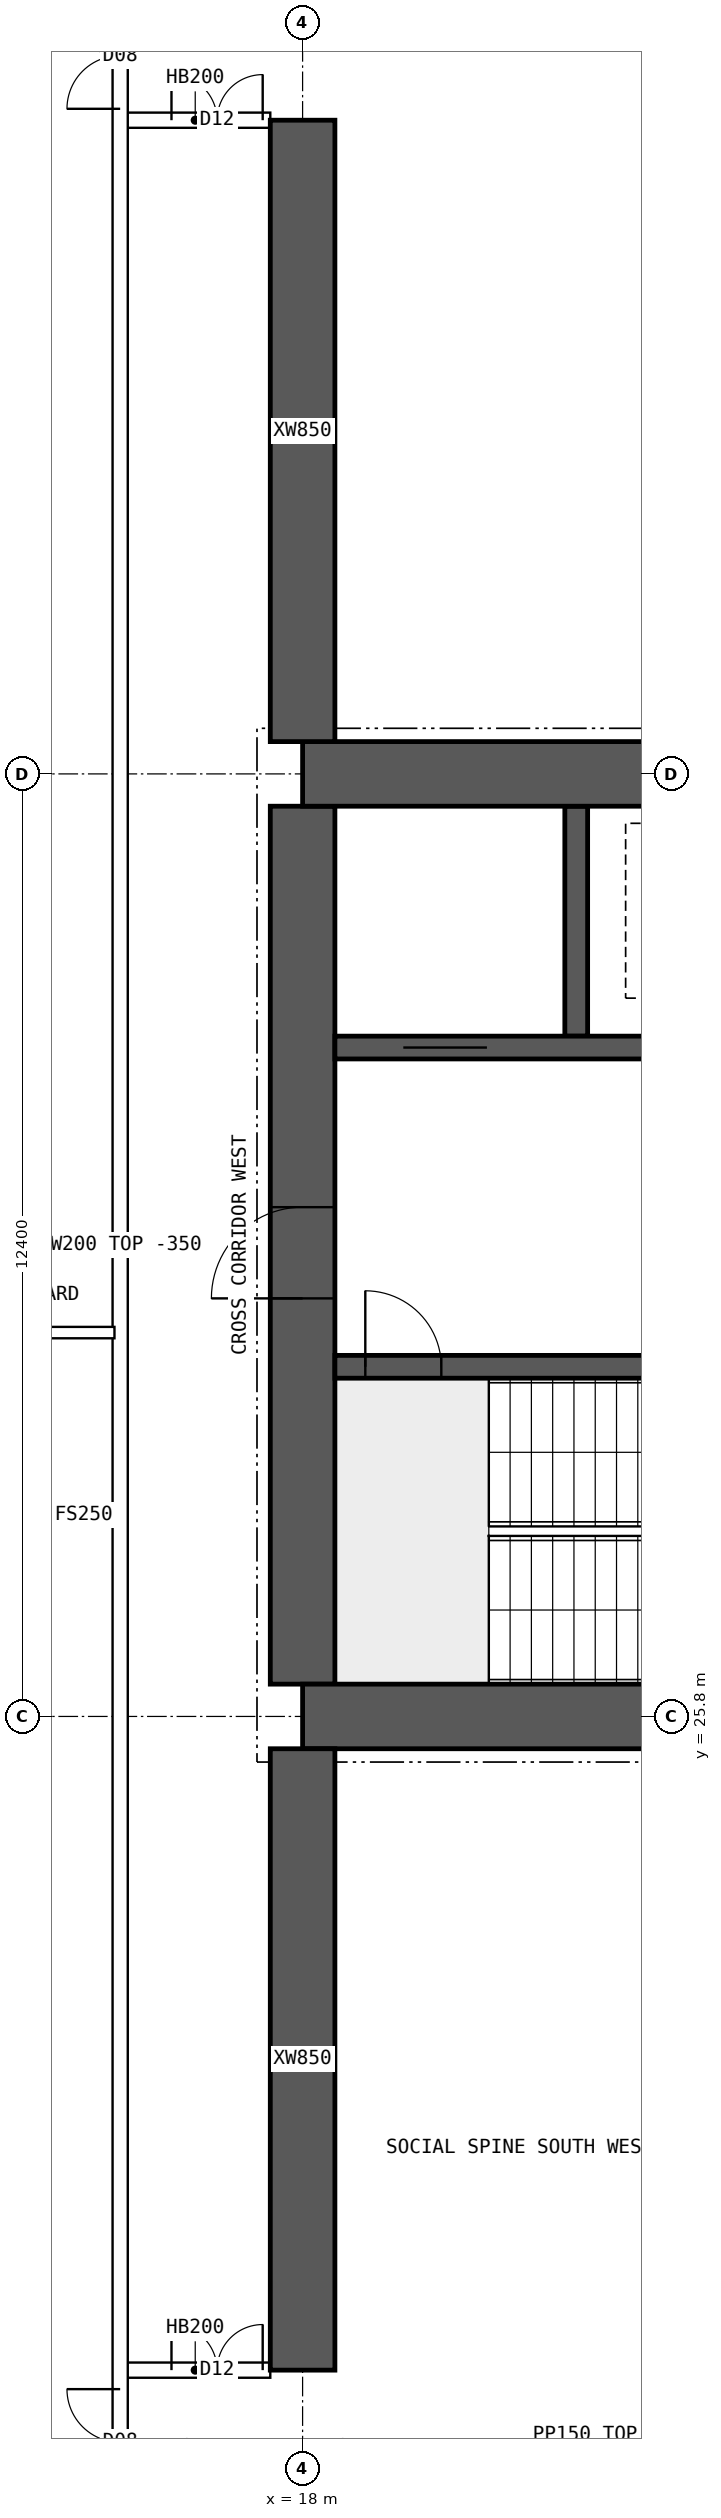
"""IFC4 building model, lengths in metres.
Left out: names, types, materials, properties, quantities, classifications, styles, units other than length and angle.
Written with IfcOpenShell. Run it as: python <this file> out.ifc"""

import sys

from ifc_helpers import new_model, si_unit, direction, frame, frame_2d, origin, place, context, subcontext, project, spatial, polyline, rectangle, outline, extrude, element, fill, save


model = new_model("IFC4")
c1 = context("Model", 3, precision=1e-05, world=origin(), true_north=direction((0.0, 1.0)))
c2 = subcontext(c1, "Body", "Model", "MODEL_VIEW")
j1 = project(units=[si_unit("LENGTHUNIT", "METRE"), si_unit("PLANEANGLEUNIT", "RADIAN")], contexts=[c1])
p1 = place(None, origin())
s1 = spatial("IfcSite", under=j1, at=p1, CompositionType="ELEMENT")
p2 = place(p1, origin())
s2 = spatial("IfcBuilding", under=s1, at=p2, CompositionType="ELEMENT")
p3 = place(p2, frame((0.0, 0.0, 197.35)))
s3 = spatial("IfcBuildingStorey", under=s2, at=p3, CompositionType="ELEMENT", Elevation=197.35)
for number, where, z_axis, x_axis in (
    (1, (18.0, 25.8, 0.0), (0.0, 0.0, 1.0), (1.0, 0.0, 0.0)),
    (2, (18.0, 38.2, 0.0), (0.0, 0.0, 1.0), (1.0, 0.0, 0.0)),
):
    element("IfcWall", number, at=place(p3, frame(where, z_axis=z_axis, x_axis=x_axis)), inside=s3, PredefinedType="SHEAR", context=c2, shape_type="SweptSolid", body=[
        extrude(rectangle(XDim=48.0, YDim=0.85, at=frame_2d((24.0, 0.0))), origin(), (0.0, 0.0, 1.0), 3.75),
    ])
p4 = place(p3, frame((18.0, 26.225, 0.0), z_axis=(0.0, 0.0, 1.0), x_axis=(0.0, 1.0, 0.0)))
e3 = element("IfcWall", 3, at=p4, inside=s3, PredefinedType="SHEAR", context=c2, shape_type="SweptSolid", body=[
    extrude(rectangle(XDim=11.55, YDim=0.85, at=frame_2d((5.775, 0.0))), origin(), (0.0, 0.0, 1.0), 3.75),
])
p5 = place(p4, frame((5.075, 0.0, 0.0)))
e4 = element("IfcOpeningElement", 4, at=p5, cuts=e3, PredefinedType="OPENING", context=c2, shape_type="SweptSolid", body=[
    extrude(rectangle(XDim=1.2, YDim=2.1, at=frame_2d((0.6, 1.05))), frame((0.0, 0.435, 0.0), z_axis=(0.0, -1.0, 0.0), x_axis=(1.0, 0.0, 0.0)), (0.0, 0.0, 1.0), 0.87),
])
p6 = place(p3, frame((18.425, 30.4, 0.0), z_axis=(0.0, 0.0, 1.0), x_axis=(1.0, 0.0, 0.0)))
e5 = element("IfcWall", 5, at=p6, inside=s3, PredefinedType="SHEAR", context=c2, shape_type="SweptSolid", body=[
    extrude(rectangle(XDim=47.15, YDim=0.3, at=frame_2d((23.575, 0.0))), origin(), (0.0, 0.0, 1.0), 3.75),
])
p7 = place(p6, frame((0.4, 0.0, 0.0)))
e6 = element("IfcOpeningElement", 6, at=p7, cuts=e5, PredefinedType="OPENING", context=c2, shape_type="SweptSolid", body=[
    extrude(rectangle(XDim=1.0, YDim=2.1, at=frame_2d((0.5, 1.05))), frame((0.0, 0.16, 0.0), z_axis=(0.0, -1.0, 0.0), x_axis=(1.0, 0.0, 0.0)), (0.0, 0.0, 1.0), 0.32),
])
p8 = place(p6, frame((45.75, 0.0, 0.0)))
e7 = element("IfcOpeningElement", 7, at=p8, cuts=e5, PredefinedType="OPENING", context=c2, shape_type="SweptSolid", body=[
    extrude(rectangle(XDim=1.0, YDim=2.1, at=frame_2d((0.5, 1.05))), frame((0.0, 0.16, 0.0), z_axis=(0.0, -1.0, 0.0), x_axis=(1.0, 0.0, 0.0)), (0.0, 0.0, 1.0), 0.32),
])
p9 = place(p6, frame((8.325, 0.0, 0.0)))
e8 = element("IfcOpeningElement", 8, at=p9, cuts=e5, PredefinedType="OPENING", context=c2, shape_type="SweptSolid", body=[
    extrude(rectangle(XDim=1.1, YDim=2.1, at=frame_2d((0.55, 1.05))), frame((0.0, 0.16, 0.0), z_axis=(0.0, -1.0, 0.0), x_axis=(1.0, 0.0, 0.0)), (0.0, 0.0, 1.0), 0.32),
])
p10 = place(p6, frame((10.925, 0.0, 0.0)))
e9 = element("IfcOpeningElement", 9, at=p10, cuts=e5, PredefinedType="OPENING", context=c2, shape_type="SweptSolid", body=[
    extrude(rectangle(XDim=1.1, YDim=2.1, at=frame_2d((0.55, 1.05))), frame((0.0, 0.16, 0.0), z_axis=(0.0, -1.0, 0.0), x_axis=(1.0, 0.0, 0.0)), (0.0, 0.0, 1.0), 0.32),
])
p11 = place(p6, frame((13.525, 0.0, 0.0)))
e10 = element("IfcOpeningElement", 10, at=p11, cuts=e5, PredefinedType="OPENING", context=c2, shape_type="SweptSolid", body=[
    extrude(rectangle(XDim=1.1, YDim=2.1, at=frame_2d((0.55, 1.05))), frame((0.0, 0.16, 0.0), z_axis=(0.0, -1.0, 0.0), x_axis=(1.0, 0.0, 0.0)), (0.0, 0.0, 1.0), 0.32),
])
p12 = place(p6, frame((16.125, 0.0, 0.0)))
e11 = element("IfcOpeningElement", 11, at=p12, cuts=e5, PredefinedType="OPENING", context=c2, shape_type="SweptSolid", body=[
    extrude(rectangle(XDim=1.1, YDim=2.1, at=frame_2d((0.55, 1.05))), frame((0.0, 0.16, 0.0), z_axis=(0.0, -1.0, 0.0), x_axis=(1.0, 0.0, 0.0)), (0.0, 0.0, 1.0), 0.32),
])
p13 = place(p6, frame((18.9, 0.0, 0.0)))
e12 = element("IfcOpeningElement", 12, at=p13, cuts=e5, PredefinedType="OPENING", context=c2, shape_type="SweptSolid", body=[
    extrude(rectangle(XDim=0.9, YDim=2.1, at=frame_2d((0.45, 1.05))), frame((0.0, 0.16, 0.0), z_axis=(0.0, -1.0, 0.0), x_axis=(1.0, 0.0, 0.0)), (0.0, 0.0, 1.0), 0.32),
])
p14 = place(p6, frame((30.192, 0.0, 0.0)))
e13 = element("IfcOpeningElement", 13, at=p14, cuts=e5, PredefinedType="OPENING", context=c2, shape_type="SweptSolid", body=[
    extrude(rectangle(XDim=1.1, YDim=2.1, at=frame_2d((0.55, 1.05))), frame((0.0, 0.16, 0.0), z_axis=(0.0, -1.0, 0.0), x_axis=(1.0, 0.0, 0.0)), (0.0, 0.0, 1.0), 0.32),
])
p15 = place(p6, frame((33.725, 0.0, 0.0)))
e14 = element("IfcOpeningElement", 14, at=p15, cuts=e5, PredefinedType="OPENING", context=c2, shape_type="SweptSolid", body=[
    extrude(rectangle(XDim=1.1, YDim=2.1, at=frame_2d((0.55, 1.05))), frame((0.0, 0.16, 0.0), z_axis=(0.0, -1.0, 0.0), x_axis=(1.0, 0.0, 0.0)), (0.0, 0.0, 1.0), 0.32),
])
p16 = place(p6, frame((37.258, 0.0, 0.0)))
e15 = element("IfcOpeningElement", 15, at=p16, cuts=e5, PredefinedType="OPENING", context=c2, shape_type="SweptSolid", body=[
    extrude(rectangle(XDim=1.1, YDim=2.1, at=frame_2d((0.55, 1.05))), frame((0.0, 0.16, 0.0), z_axis=(0.0, -1.0, 0.0), x_axis=(1.0, 0.0, 0.0)), (0.0, 0.0, 1.0), 0.32),
])
p17 = place(p3, frame((18.425, 34.6, 0.0), z_axis=(0.0, 0.0, 1.0), x_axis=(1.0, 0.0, 0.0)))
e16 = element("IfcWall", 16, at=p17, inside=s3, PredefinedType="SHEAR", context=c2, shape_type="SweptSolid", body=[
    extrude(rectangle(XDim=47.15, YDim=0.3, at=frame_2d((23.575, 0.0))), origin(), (0.0, 0.0, 1.0), 3.75),
])
p18 = place(p17, frame((0.9, 0.0, 0.0)))
e17 = element("IfcOpeningElement", 17, at=p18, cuts=e16, PredefinedType="OPENING", context=c2, shape_type="SweptSolid", body=[
    extrude(rectangle(XDim=1.1, YDim=2.1, at=frame_2d((0.55, 1.05))), frame((0.0, 0.16, 0.0), z_axis=(0.0, -1.0, 0.0), x_axis=(1.0, 0.0, 0.0)), (0.0, 0.0, 1.0), 0.32),
])
p19 = place(p17, frame((45.15, 0.0, 0.0)))
e18 = element("IfcOpeningElement", 18, at=p19, cuts=e16, PredefinedType="OPENING", context=c2, shape_type="SweptSolid", body=[
    extrude(rectangle(XDim=1.1, YDim=2.1, at=frame_2d((0.55, 1.05))), frame((0.0, 0.16, 0.0), z_axis=(0.0, -1.0, 0.0), x_axis=(1.0, 0.0, 0.0)), (0.0, 0.0, 1.0), 0.32),
])
p20 = place(p17, frame((4.175, 0.0, 0.0)))
e19 = element("IfcOpeningElement", 19, at=p20, cuts=e16, PredefinedType="OPENING", context=c2, shape_type="SweptSolid", body=[
    extrude(rectangle(XDim=0.9, YDim=2.1, at=frame_2d((0.45, 1.05))), frame((0.0, 0.16, 0.0), z_axis=(0.0, -1.0, 0.0), x_axis=(1.0, 0.0, 0.0)), (0.0, 0.0, 1.0), 0.32),
])
p21 = place(p17, frame((42.075, 0.0, 0.0)))
e20 = element("IfcOpeningElement", 20, at=p21, cuts=e16, PredefinedType="OPENING", context=c2, shape_type="SweptSolid", body=[
    extrude(rectangle(XDim=0.9, YDim=2.1, at=frame_2d((0.45, 1.05))), frame((0.0, 0.16, 0.0), z_axis=(0.0, -1.0, 0.0), x_axis=(1.0, 0.0, 0.0)), (0.0, 0.0, 1.0), 0.32),
])
p22 = place(p17, frame((8.95, 0.0, 0.0)))
e21 = element("IfcOpeningElement", 21, at=p22, cuts=e16, PredefinedType="OPENING", context=c2, shape_type="SweptSolid", body=[
    extrude(rectangle(XDim=0.9, YDim=2.1, at=frame_2d((0.45, 1.05))), frame((0.0, 0.16, 0.0), z_axis=(0.0, -1.0, 0.0), x_axis=(1.0, 0.0, 0.0)), (0.0, 0.0, 1.0), 0.32),
])
p23 = place(p17, frame((12.924, 0.0, 0.0)))
e22 = element("IfcOpeningElement", 22, at=p23, cuts=e16, PredefinedType="OPENING", context=c2, shape_type="SweptSolid", body=[
    extrude(rectangle(XDim=0.9, YDim=2.1, at=frame_2d((0.45, 1.05))), frame((0.0, 0.16, 0.0), z_axis=(0.0, -1.0, 0.0), x_axis=(1.0, 0.0, 0.0)), (0.0, 0.0, 1.0), 0.32),
])
p24 = place(p17, frame((16.571, 0.0, 0.0)))
e23 = element("IfcOpeningElement", 23, at=p24, cuts=e16, PredefinedType="OPENING", context=c2, shape_type="SweptSolid", body=[
    extrude(rectangle(XDim=0.9, YDim=2.1, at=frame_2d((0.45, 1.05))), frame((0.0, 0.16, 0.0), z_axis=(0.0, -1.0, 0.0), x_axis=(1.0, 0.0, 0.0)), (0.0, 0.0, 1.0), 0.32),
])
p25 = place(p17, frame((20.33, 0.0, 0.0)))
e24 = element("IfcOpeningElement", 24, at=p25, cuts=e16, PredefinedType="OPENING", context=c2, shape_type="SweptSolid", body=[
    extrude(rectangle(XDim=0.9, YDim=2.1, at=frame_2d((0.45, 1.05))), frame((0.0, 0.16, 0.0), z_axis=(0.0, -1.0, 0.0), x_axis=(1.0, 0.0, 0.0)), (0.0, 0.0, 1.0), 0.32),
])
p26 = place(p17, frame((24.736, 0.0, 0.0)))
e25 = element("IfcOpeningElement", 25, at=p26, cuts=e16, PredefinedType="OPENING", context=c2, shape_type="SweptSolid", body=[
    extrude(rectangle(XDim=0.9, YDim=2.1, at=frame_2d((0.45, 1.05))), frame((0.0, 0.16, 0.0), z_axis=(0.0, -1.0, 0.0), x_axis=(1.0, 0.0, 0.0)), (0.0, 0.0, 1.0), 0.32),
])
p27 = place(p17, frame((27.533, 0.0, 0.0)))
e26 = element("IfcOpeningElement", 26, at=p27, cuts=e16, PredefinedType="OPENING", context=c2, shape_type="SweptSolid", body=[
    extrude(rectangle(XDim=0.9, YDim=2.1, at=frame_2d((0.45, 1.05))), frame((0.0, 0.16, 0.0), z_axis=(0.0, -1.0, 0.0), x_axis=(1.0, 0.0, 0.0)), (0.0, 0.0, 1.0), 0.32),
])
p28 = place(p17, frame((29.703, 0.0, 0.0)))
e27 = element("IfcOpeningElement", 27, at=p28, cuts=e16, PredefinedType="OPENING", context=c2, shape_type="SweptSolid", body=[
    extrude(rectangle(XDim=0.9, YDim=2.1, at=frame_2d((0.45, 1.05))), frame((0.0, 0.16, 0.0), z_axis=(0.0, -1.0, 0.0), x_axis=(1.0, 0.0, 0.0)), (0.0, 0.0, 1.0), 0.32),
])
p29 = place(p17, frame((33.502, 0.0, 0.0)))
e28 = element("IfcOpeningElement", 28, at=p29, cuts=e16, PredefinedType="OPENING", context=c2, shape_type="SweptSolid", body=[
    extrude(rectangle(XDim=0.9, YDim=2.1, at=frame_2d((0.45, 1.05))), frame((0.0, 0.16, 0.0), z_axis=(0.0, -1.0, 0.0), x_axis=(1.0, 0.0, 0.0)), (0.0, 0.0, 1.0), 0.32),
])
p30 = place(p17, frame((37.453, 0.0, 0.0)))
e29 = element("IfcOpeningElement", 29, at=p30, cuts=e16, PredefinedType="OPENING", context=c2, shape_type="SweptSolid", body=[
    extrude(rectangle(XDim=0.9, YDim=2.1, at=frame_2d((0.45, 1.05))), frame((0.0, 0.16, 0.0), z_axis=(0.0, -1.0, 0.0), x_axis=(1.0, 0.0, 0.0)), (0.0, 0.0, 1.0), 0.32),
])
p31 = place(p3, frame((21.6, 34.75, 0.0), z_axis=(0.0, 0.0, 1.0), x_axis=(0.0, 1.0, 0.0)))
e30 = element("IfcWall", 30, at=p31, inside=s3, PredefinedType="SHEAR", context=c2, shape_type="SweptSolid", body=[
    extrude(rectangle(XDim=3.025, YDim=0.3, at=frame_2d((1.512, 0.0))), origin(), (0.0, 0.0, 1.0), 3.75),
])
for number, where, z_axis, x_axis in (
    (31, (18.0, 17.2, 0.0), (0.0, 0.0, 1.0), (0.0, 1.0, 0.0)),
    (32, (18.0, 38.625, 0.0), (0.0, 0.0, 1.0), (0.0, 1.0, 0.0)),
):
    element("IfcWall", number, at=place(p3, frame(where, z_axis=z_axis, x_axis=x_axis)), inside=s3, PredefinedType="SHEAR", context=c2, shape_type="SweptSolid", body=[
        extrude(rectangle(XDim=8.175, YDim=0.85, at=frame_2d((4.087, 0.0))), origin(), (0.0, 0.0, 1.0), 3.75),
    ])
p32 = place(p3, frame((15.6, 17.2, 0.0), z_axis=(0.0, 0.0, 1.0), x_axis=(1.0, 0.0, 0.0)))
e33 = element("IfcWall", 33, at=p32, inside=s3, PredefinedType="SOLIDWALL", context=c2, shape_type="SweptSolid", body=[
    extrude(rectangle(XDim=1.975, YDim=0.2, at=frame_2d((0.987, 0.0))), origin(), (0.0, 0.0, 1.0), 3.4),
])
p33 = place(p32, frame((0.675, 0.0, 0.0)))
e34 = element("IfcOpeningElement", 34, at=p33, cuts=e33, PredefinedType="OPENING", context=c2, shape_type="SweptSolid", body=[
    extrude(rectangle(XDim=1.2, YDim=2.1, at=frame_2d((0.6, 1.05))), frame((0.0, 0.11, 0.0), z_axis=(0.0, -1.0, 0.0), x_axis=(1.0, 0.0, 0.0)), (0.0, 0.0, 1.0), 0.22),
])
p34 = place(p3, frame((15.6, 46.8, 0.0), z_axis=(0.0, 0.0, 1.0), x_axis=(1.0, 0.0, 0.0)))
e35 = element("IfcWall", 35, at=p34, inside=s3, PredefinedType="SOLIDWALL", context=c2, shape_type="SweptSolid", body=[
    extrude(rectangle(XDim=1.975, YDim=0.2, at=frame_2d((0.987, 0.0))), origin(), (0.0, 0.0, 1.0), 3.4),
])
p35 = place(p34, frame((0.675, 0.0, 0.0)))
e36 = element("IfcOpeningElement", 36, at=p35, cuts=e35, PredefinedType="OPENING", context=c2, shape_type="SweptSolid", body=[
    extrude(rectangle(XDim=1.2, YDim=2.1, at=frame_2d((0.6, 1.05))), frame((0.0, 0.11, 0.0), z_axis=(0.0, -1.0, 0.0), x_axis=(1.0, 0.0, 0.0)), (0.0, 0.0, 1.0), 0.22),
])
p36 = place(p3, frame((8.705, 30.85, 0.0), z_axis=(0.0, 0.0, 1.0), x_axis=(1.0, 0.0, 0.0)))
e37 = element("IfcWall", 37, at=p36, inside=s3, PredefinedType="PARTITIONING", context=c2, shape_type="SweptSolid", body=[
    extrude(outline(polyline([(0.0, 0.0), (6.82, 0.0), (6.82, 3.4), (3.597, 3.4), (3.595, 2.95), (2.997, 2.95), (2.995, 3.4), (0.0, 3.4), (0.0, 0.0)])), frame((0.0, 0.075, 0.0), z_axis=(0.0, -1.0, 0.0), x_axis=(1.0, 0.0, 0.0)), (0.0, 0.0, 1.0), 0.15),
])
p37 = place(p3, frame((15.6, 10.446, 0.0), z_axis=(0.0, 0.0, 1.0), x_axis=(0.0, 1.0, 0.0)))
e38 = element("IfcWall", 38, at=p37, inside=s3, PredefinedType="SOLIDWALL", context=c2, shape_type="SweptSolid", body=[
    extrude(rectangle(XDim=43.107, YDim=0.2, at=frame_2d((21.554, 0.0))), origin(), (0.0, 0.0, 1.0), 3.4),
])
p38 = place(p37, frame((5.104, 0.0, 0.0)))
e39 = element("IfcOpeningElement", 39, at=p38, cuts=e38, PredefinedType="OPENING", context=c2, shape_type="SweptSolid", body=[
    extrude(rectangle(XDim=1.4, YDim=2.1, at=frame_2d((0.7, 1.05))), frame((0.0, 0.11, 0.0), z_axis=(0.0, -1.0, 0.0), x_axis=(1.0, 0.0, 0.0)), (0.0, 0.0, 1.0), 0.22),
])
p39 = place(p37, frame((36.504, 0.0, 0.0)))
e40 = element("IfcOpeningElement", 40, at=p39, cuts=e38, PredefinedType="OPENING", context=c2, shape_type="SweptSolid", body=[
    extrude(rectangle(XDim=1.4, YDim=2.1, at=frame_2d((0.7, 1.05))), frame((0.0, 0.11, 0.0), z_axis=(0.0, -1.0, 0.0), x_axis=(1.0, 0.0, 0.0)), (0.0, 0.0, 1.0), 0.22),
])
p40 = place(p5, origin())
e41 = element("IfcDoor", 41, at=p40, inside=s3, OperationType="SINGLE_SWING_LEFT", PredefinedType="DOOR", context=c2, shape_type="SweptSolid", body=[
    extrude(rectangle(XDim=1.2, YDim=2.1, at=frame_2d((0.6, 1.05))), frame((0.0, 0.025, 0.0), z_axis=(0.0, -1.0, 0.0), x_axis=(1.0, 0.0, 0.0)), (0.0, 0.0, 1.0), 0.05),
])
fill(e4, e41)
p41 = place(p7, origin())
e42 = element("IfcDoor", 42, at=p41, inside=s3, OperationType="SINGLE_SWING_LEFT", PredefinedType="DOOR", context=c2, shape_type="SweptSolid", body=[
    extrude(rectangle(XDim=1.0, YDim=2.1, at=frame_2d((0.5, 1.05))), frame((0.0, 0.025, 0.0), z_axis=(0.0, -1.0, 0.0), x_axis=(1.0, 0.0, 0.0)), (0.0, 0.0, 1.0), 0.05),
])
fill(e6, e42)
p42 = place(p18, origin())
e43 = element("IfcDoor", 43, at=p42, inside=s3, OperationType="DOUBLE_DOOR_SLIDING", PredefinedType="DOOR", context=c2, shape_type="SweptSolid", body=[
    extrude(rectangle(XDim=1.1, YDim=2.1, at=frame_2d((0.55, 1.05))), frame((0.0, 0.025, 0.0), z_axis=(0.0, -1.0, 0.0), x_axis=(1.0, 0.0, 0.0)), (0.0, 0.0, 1.0), 0.05),
])
fill(e17, e43)
p43 = place(p33, origin())
e44 = element("IfcDoor", 44, at=p43, inside=s3, OperationType="DOUBLE_DOOR_SINGLE_SWING", PredefinedType="DOOR", context=c2, shape_type="SweptSolid", body=[
    extrude(rectangle(XDim=1.2, YDim=2.1, at=frame_2d((0.6, 1.05))), frame((0.0, 0.025, 0.0), z_axis=(0.0, -1.0, 0.0), x_axis=(1.0, 0.0, 0.0)), (0.0, 0.0, 1.0), 0.05),
])
fill(e34, e44)
p44 = place(p35, origin())
e45 = element("IfcDoor", 45, at=p44, inside=s3, OperationType="DOUBLE_DOOR_SINGLE_SWING", PredefinedType="DOOR", context=c2, shape_type="SweptSolid", body=[
    extrude(rectangle(XDim=1.2, YDim=2.1, at=frame_2d((0.6, 1.05))), frame((0.0, 0.025, 0.0), z_axis=(0.0, -1.0, 0.0), x_axis=(1.0, 0.0, 0.0)), (0.0, 0.0, 1.0), 0.05),
])
fill(e36, e45)
p45 = place(p38, origin())
e46 = element("IfcDoor", 46, at=p45, inside=s3, OperationType="DOUBLE_DOOR_SINGLE_SWING", PredefinedType="DOOR", context=c2, shape_type="SweptSolid", body=[
    extrude(rectangle(XDim=1.4, YDim=2.1, at=frame_2d((0.7, 1.05))), frame((0.0, 0.025, 0.0), z_axis=(0.0, -1.0, 0.0), x_axis=(1.0, 0.0, 0.0)), (0.0, 0.0, 1.0), 0.05),
])
fill(e39, e46)
p46 = place(p39, origin())
e47 = element("IfcDoor", 47, at=p46, inside=s3, OperationType="DOUBLE_DOOR_SINGLE_SWING", PredefinedType="DOOR", context=c2, shape_type="SweptSolid", body=[
    extrude(rectangle(XDim=1.4, YDim=2.1, at=frame_2d((0.7, 1.05))), frame((0.0, 0.025, 0.0), z_axis=(0.0, -1.0, 0.0), x_axis=(1.0, 0.0, 0.0)), (0.0, 0.0, 1.0), 0.05),
])
fill(e40, e47)
save(model, sys.argv[1])
